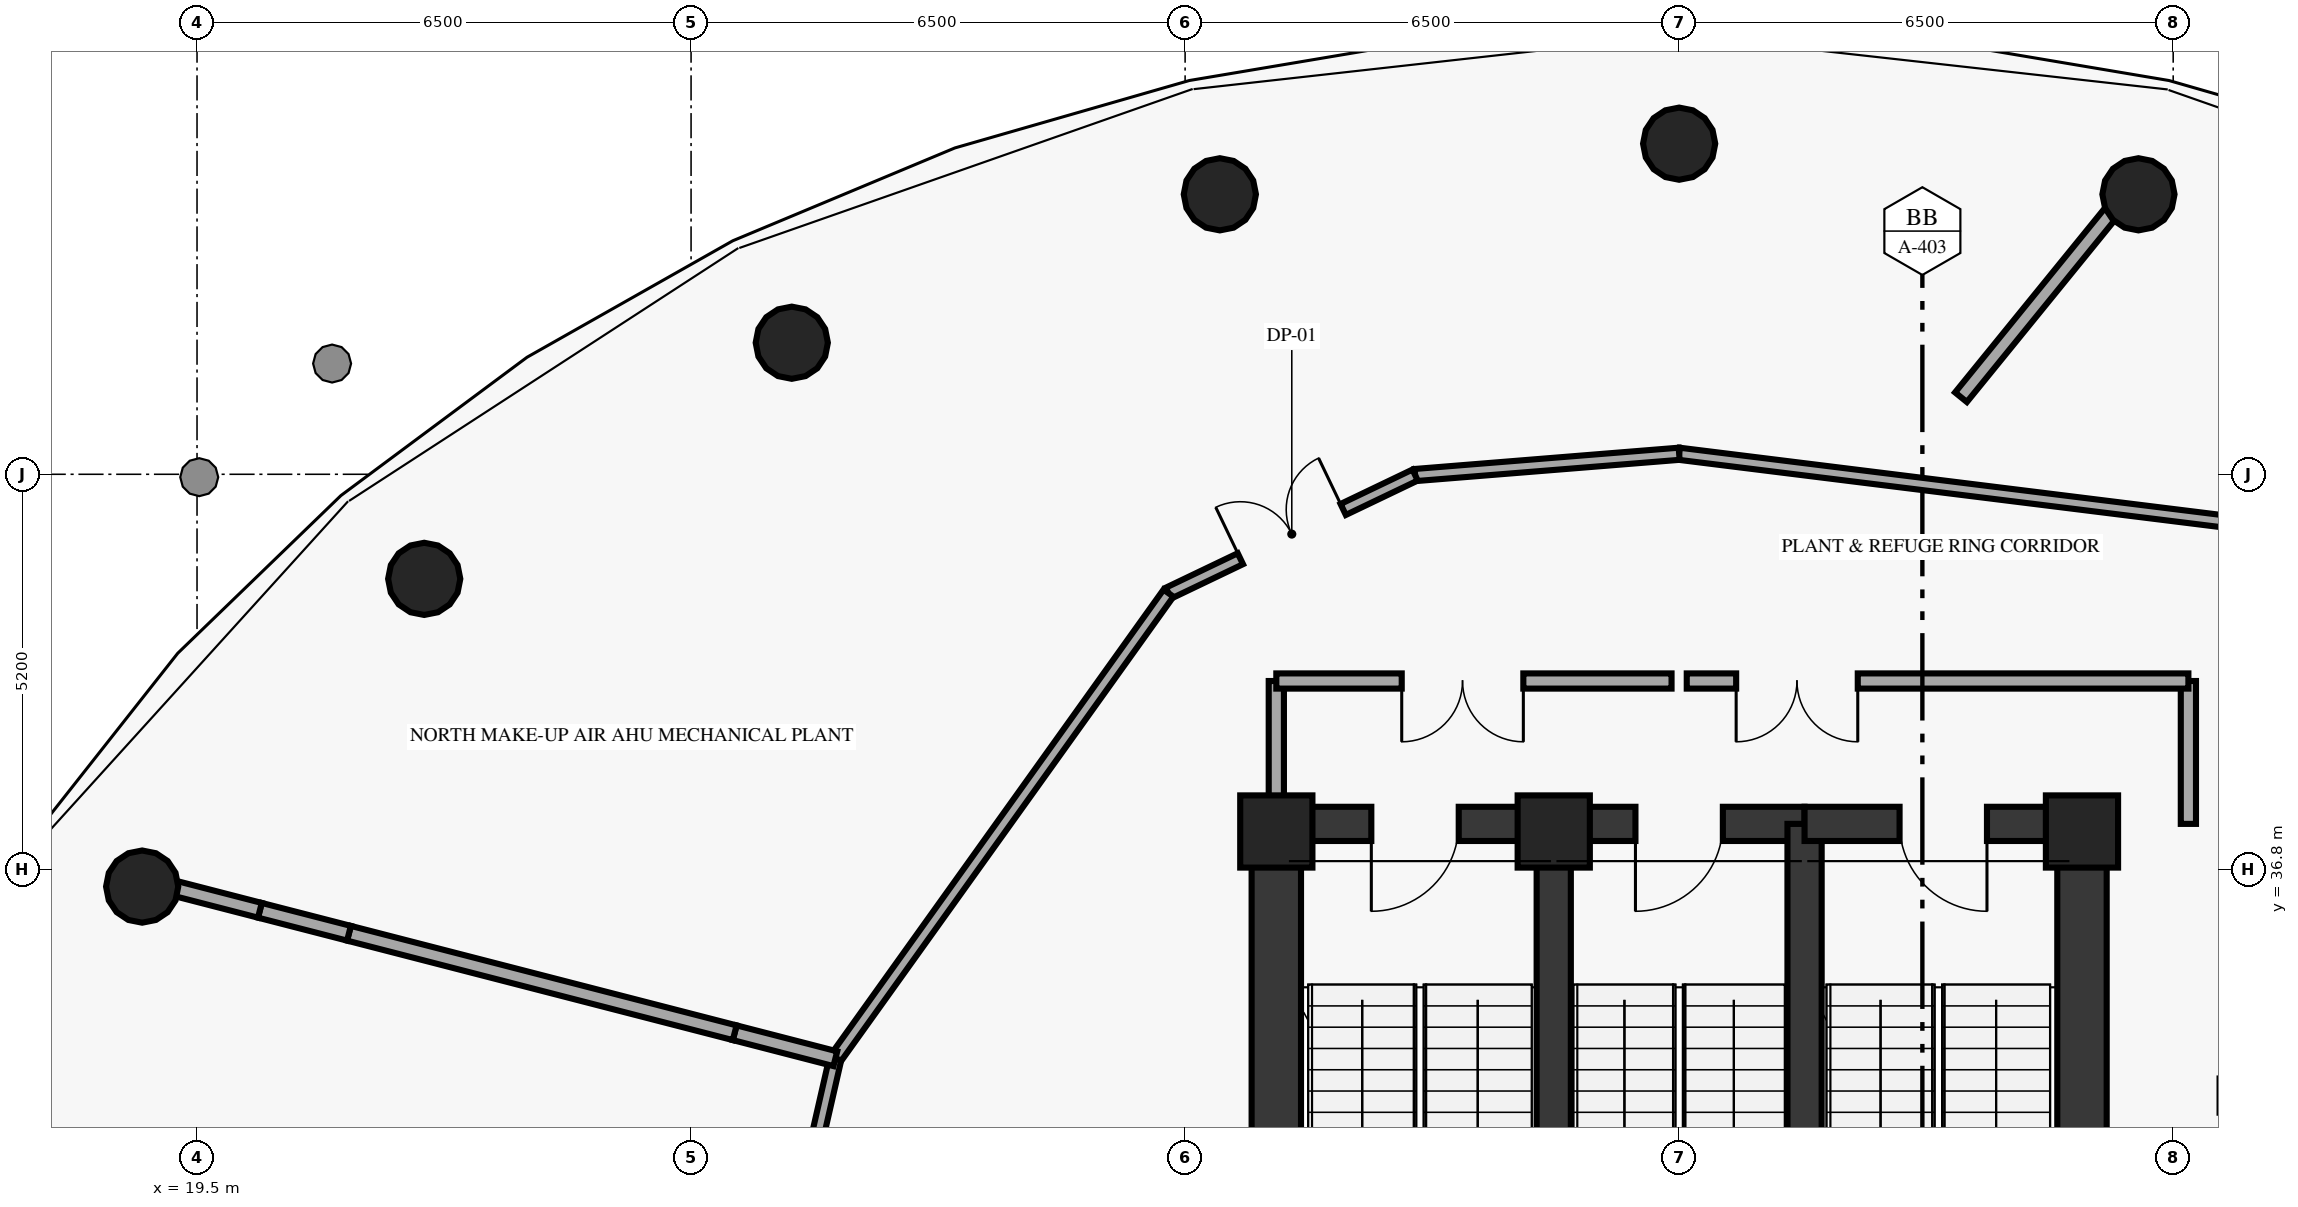
"""IFC4 building model, lengths in metres.
Left out: names, types, materials, properties, quantities, classifications, styles, units other than length and angle.
Written with IfcOpenShell. Run it as: python <this file> out.ifc"""

import sys

from ifc_helpers import new_model, si_unit, direction, frame, frame_2d, origin, origin_2d, place, context, subcontext, project, spatial, rectangle, circle, extrude, element, fill, save


model = new_model("IFC4")
c1 = context("Model", 3, precision=1e-05, world=origin(), true_north=direction((0.0, 1.0)))
c2 = subcontext(c1, "Body", "Model", "MODEL_VIEW")
j1 = project(units=[si_unit("LENGTHUNIT", "METRE"), si_unit("PLANEANGLEUNIT", "RADIAN")], contexts=[c1])
p1 = place(None, origin())
s1 = spatial("IfcSite", under=j1, at=p1, CompositionType="ELEMENT")
p2 = place(p1, origin())
s2 = spatial("IfcBuilding", under=s1, at=p2, CompositionType="ELEMENT")
p3 = place(p2, frame((0.0, 0.0, 195.95)))
s3 = spatial("IfcBuildingStorey", under=s2, at=p3, CompositionType="ELEMENT", Elevation=195.95)
for number, where, z_axis, x_axis in (
    (1, (44.3, 37.3, 0.0), (0.0, 0.0, 1.0), (1.0, 0.0, 0.0)),
    (2, (37.35, 37.3, 0.0), (0.0, 0.0, 1.0), (1.0, 0.0, 0.0)),
    (3, (33.7, 37.3, 0.0), (0.0, 0.0, 1.0), (1.0, 0.0, 0.0)),
):
    element("IfcColumn", number, at=place(p3, frame(where, z_axis=z_axis, x_axis=x_axis)), inside=s3, PredefinedType="PILASTER", context=c2, shape_type="SweptSolid", body=[
        extrude(rectangle(XDim=0.95, YDim=0.95, at=origin_2d()), origin(), (0.0, 0.0, 1.0), 6.88),
    ])
for number, where, z_axis, x_axis in (
    (4, (45.043, 45.684, 0.0), (0.0, 0.0, 1.0), (1.0, 0.0, 0.0)),
    (5, (39.0, 46.35, 0.0), (0.0, 0.0, 1.0), (1.0, 0.0, 0.0)),
    (6, (32.957, 45.684, 0.0), (0.0, 0.0, 1.0), (1.0, 0.0, 0.0)),
    (7, (27.325, 43.731, 0.0), (0.0, 0.0, 1.0), (1.0, 0.0, 0.0)),
    (8, (22.489, 40.624, 0.0), (0.0, 0.0, 1.0), (1.0, 0.0, 0.0)),
    (9, (18.778, 36.575, 0.0), (0.0, 0.0, 1.0), (1.0, 0.0, 0.0)),
):
    element("IfcColumn", number, at=place(p3, frame(where, z_axis=z_axis, x_axis=x_axis)), inside=s3, PredefinedType="COLUMN", context=c2, shape_type="SweptSolid", body=[
        extrude(circle(Radius=0.475, at=origin_2d()), origin(), (0.0, 0.0, 1.0), 6.88),
    ])
for number, where, z_axis, x_axis in (
    (10, (33.7, 29.05, 0.0), (0.0, 0.0, 1.0), (0.0, 1.0, 0.0)),
    (11, (44.3, 29.05, 0.0), (0.0, 0.0, 1.0), (0.0, 1.0, 0.0)),
):
    element("IfcWall", number, at=place(p3, frame(where, z_axis=z_axis, x_axis=x_axis)), inside=s3, PredefinedType="SHEAR", context=c2, shape_type="SweptSolid", body=[
        extrude(rectangle(XDim=8.35, YDim=0.65, at=frame_2d((4.175, 0.0))), origin(), (0.0, 0.0, 1.0), 6.88),
    ])
p4 = place(p3, frame((37.35, 37.4, 0.0), z_axis=(0.0, 0.0, 1.0), x_axis=(-1.0, 0.0, 0.0)))
e12 = element("IfcWall", 12, at=p4, inside=s3, PredefinedType="SHEAR", context=c2, shape_type="SweptSolid", body=[
    extrude(rectangle(XDim=3.65, YDim=0.45, at=frame_2d((1.825, 0.0))), origin(), (0.0, 0.0, 1.0), 6.88),
])
p5 = place(p4, frame((1.25, 0.0, 0.0)))
e13 = element("IfcOpeningElement", 13, at=p5, cuts=e12, PredefinedType="OPENING", context=c2, shape_type="SweptSolid", body=[
    extrude(rectangle(XDim=1.15, YDim=2.15, at=frame_2d((0.575, 1.075))), frame((0.0, 0.235, 0.0), z_axis=(0.0, -1.0, 0.0), x_axis=(1.0, 0.0, 0.0)), (0.0, 0.0, 1.0), 0.47),
])
p6 = place(p3, frame((37.35, 29.05, 0.0), z_axis=(0.0, 0.0, 1.0), x_axis=(0.0, 1.0, 0.0)))
e14 = element("IfcWall", 14, at=p6, inside=s3, PredefinedType="SHEAR", context=c2, shape_type="SweptSolid", body=[
    extrude(rectangle(XDim=8.35, YDim=0.45, at=frame_2d((4.175, 0.0))), origin(), (0.0, 0.0, 1.0), 6.88),
])
p7 = place(p3, frame((40.65, 37.4, 0.0), z_axis=(0.0, 0.0, 1.0), x_axis=(-1.0, 0.0, 0.0)))
e15 = element("IfcWall", 15, at=p7, inside=s3, PredefinedType="SHEAR", context=c2, shape_type="SweptSolid", body=[
    extrude(rectangle(XDim=3.3, YDim=0.45, at=frame_2d((1.65, 0.0))), origin(), (0.0, 0.0, 1.0), 6.88),
])
p8 = place(p7, frame((1.075, 0.0, 0.0)))
e16 = element("IfcOpeningElement", 16, at=p8, cuts=e15, PredefinedType="OPENING", context=c2, shape_type="SweptSolid", body=[
    extrude(rectangle(XDim=1.15, YDim=2.15, at=frame_2d((0.575, 1.075))), frame((0.0, 0.235, 0.0), z_axis=(0.0, -1.0, 0.0), x_axis=(1.0, 0.0, 0.0)), (0.0, 0.0, 1.0), 0.47),
])
p9 = place(p3, frame((40.65, 29.05, 0.0), z_axis=(0.0, 0.0, 1.0), x_axis=(0.0, 1.0, 0.0)))
e17 = element("IfcWall", 17, at=p9, inside=s3, PredefinedType="SHEAR", context=c2, shape_type="SweptSolid", body=[
    extrude(rectangle(XDim=8.35, YDim=0.45, at=frame_2d((4.175, 0.0))), origin(), (0.0, 0.0, 1.0), 6.88),
])
p10 = place(p3, frame((44.3, 37.4, 0.0), z_axis=(0.0, 0.0, 1.0), x_axis=(-1.0, 0.0, 0.0)))
e18 = element("IfcWall", 18, at=p10, inside=s3, PredefinedType="SHEAR", context=c2, shape_type="SweptSolid", body=[
    extrude(rectangle(XDim=3.65, YDim=0.45, at=frame_2d((1.825, 0.0))), origin(), (0.0, 0.0, 1.0), 6.88),
])
p11 = place(p10, frame((1.25, 0.0, 0.0)))
e19 = element("IfcOpeningElement", 19, at=p11, cuts=e18, PredefinedType="OPENING", context=c2, shape_type="SweptSolid", body=[
    extrude(rectangle(XDim=1.15, YDim=2.15, at=frame_2d((0.575, 1.075))), frame((0.0, 0.235, 0.0), z_axis=(0.0, -1.0, 0.0), x_axis=(1.0, 0.0, 0.0)), (0.0, 0.0, 1.0), 0.47),
])
for number, where, z_axis, x_axis in (
    (20, (33.7, 37.4, 0.0), (0.0, 0.0, 1.0), (0.0, 1.0, 0.0)),
    (21, (45.7, 37.4, 0.0), (0.0, 0.0, 1.0), (0.0, 1.0, 0.0)),
):
    element("IfcWall", number, at=place(p3, frame(where, z_axis=z_axis, x_axis=x_axis)), inside=s3, PredefinedType="SOLIDWALL", context=c2, shape_type="SweptSolid", body=[
        extrude(rectangle(XDim=1.88, YDim=0.2, at=frame_2d((0.94, 0.0))), origin(), (0.0, 0.0, 1.0), 6.88),
    ])
p12 = place(p3, frame((38.9, 39.28, 0.0), z_axis=(0.0, 0.0, 1.0), x_axis=(-1.0, 0.0, 0.0)))
e22 = element("IfcWall", 22, at=p12, inside=s3, PredefinedType="SOLIDWALL", context=c2, shape_type="SweptSolid", body=[
    extrude(rectangle(XDim=5.2, YDim=0.2, at=frame_2d((2.6, 0.0))), origin(), (0.0, 0.0, 1.0), 6.88),
])
p13 = place(p12, frame((1.95, 0.0, 0.0)))
e23 = element("IfcOpeningElement", 23, at=p13, cuts=e22, PredefinedType="OPENING", context=c2, shape_type="SweptSolid", body=[
    extrude(rectangle(XDim=1.6, YDim=2.2, at=frame_2d((0.8, 1.1))), frame((0.0, 0.11, 0.0), z_axis=(0.0, -1.0, 0.0), x_axis=(1.0, 0.0, 0.0)), (0.0, 0.0, 1.0), 0.22),
])
p14 = place(p3, frame((45.7, 39.28, 0.0), z_axis=(0.0, 0.0, 1.0), x_axis=(-1.0, 0.0, 0.0)))
e24 = element("IfcWall", 24, at=p14, inside=s3, PredefinedType="SOLIDWALL", context=c2, shape_type="SweptSolid", body=[
    extrude(rectangle(XDim=6.6, YDim=0.2, at=frame_2d((3.3, 0.0))), origin(), (0.0, 0.0, 1.0), 6.88),
])
p15 = place(p14, frame((4.35, 0.0, 0.0)))
e25 = element("IfcOpeningElement", 25, at=p15, cuts=e24, PredefinedType="OPENING", context=c2, shape_type="SweptSolid", body=[
    extrude(rectangle(XDim=1.6, YDim=2.2, at=frame_2d((0.8, 1.1))), frame((0.0, 0.11, 0.0), z_axis=(0.0, -1.0, 0.0), x_axis=(1.0, 0.0, 0.0)), (0.0, 0.0, 1.0), 0.22),
])
p16 = place(p3, frame((46.184, 41.378, 0.0), z_axis=(0.0, 0.0, 1.0), x_axis=(-0.992378204756, 0.12322945559, 0.0)))
e26 = element("IfcWall", 26, at=p16, inside=s3, PredefinedType="PARTITIONING", context=c2, shape_type="SweptSolid", body=[
    extrude(rectangle(XDim=7.239, YDim=0.16, at=frame_2d((3.62, 0.0))), origin(), (0.0, 0.0, 1.0), 6.88),
])
p17 = place(p3, frame((39.0, 42.27, 0.0), z_axis=(0.0, 0.0, 1.0), x_axis=(-0.99676721303, -0.080343780277, 0.0)))
e27 = element("IfcWall", 27, at=p17, inside=s3, PredefinedType="PARTITIONING", context=c2, shape_type="SweptSolid", body=[
    extrude(rectangle(XDim=3.485, YDim=0.16, at=frame_2d((1.743, 0.0))), origin(), (0.0, 0.0, 1.0), 6.88),
])
p18 = place(p3, frame((32.281, 40.436, 0.0), z_axis=(0.0, 0.0, 1.0), x_axis=(0.901911315708, 0.43192126435, 0.0)))
e28 = element("IfcWall", 28, at=p18, inside=s3, PredefinedType="PARTITIONING", context=c2, shape_type="SweptSolid", body=[
    extrude(rectangle(XDim=3.598, YDim=0.16, at=frame_2d((1.799, 0.0))), origin(), (0.0, 0.0, 1.0), 6.88),
])
p19 = place(p18, frame((1.049, 0.0, 0.0)))
e29 = element("IfcOpeningElement", 29, at=p19, cuts=e28, PredefinedType="OPENING", context=c2, shape_type="SweptSolid", body=[
    extrude(rectangle(XDim=1.5, YDim=2.2, at=frame_2d((0.75, 1.1))), frame((0.0, 0.09, 0.0), z_axis=(0.0, -1.0, 0.0), x_axis=(1.0, 0.0, 0.0)), (0.0, 0.0, 1.0), 0.18),
])
p20 = place(p3, frame((32.281, 40.436, 0.0), z_axis=(0.0, 0.0, 1.0), x_axis=(-0.581884927471, -0.813271130179, 0.0)))
e30 = element("IfcWall", 30, at=p20, inside=s3, PredefinedType="PARTITIONING", context=c2, shape_type="SweptSolid", body=[
    extrude(rectangle(XDim=7.532, YDim=0.16, at=frame_2d((3.766, 0.0))), origin(), (0.0, 0.0, 1.0), 6.88),
])
p21 = place(p3, frame((27.898, 34.31, 0.0), z_axis=(0.0, 0.0, 1.0), x_axis=(-0.223002916051, -0.974817777553, 0.0)))
e31 = element("IfcWall", 31, at=p21, inside=s3, PredefinedType="PARTITIONING", context=c2, shape_type="SweptSolid", body=[
    extrude(rectangle(XDim=7.704, YDim=0.16, at=frame_2d((3.852, 0.0))), origin(), (0.0, 0.0, 1.0), 6.88),
])
p22 = place(p3, frame((42.708, 43.014, 0.0), z_axis=(0.0, 0.0, 1.0), x_axis=(0.630674163324, 0.776047743193, 0.0)))
e32 = element("IfcWall", 32, at=p22, inside=s3, PredefinedType="SOLIDWALL", context=c2, shape_type="SweptSolid", body=[
    extrude(rectangle(XDim=3.832, YDim=0.2, at=frame_2d((1.916, 0.0))), origin(), (0.0, 0.0, 1.0), 6.88),
])
p23 = place(p3, frame((27.898, 34.31, 0.0), z_axis=(0.0, 0.0, 1.0), x_axis=(-0.968211797472, 0.250131795733, 0.0)))
e33 = element("IfcWall", 33, at=p23, inside=s3, PredefinedType="SOLIDWALL", context=c2, shape_type="SweptSolid", body=[
    extrude(rectangle(XDim=1.367, YDim=0.2, at=frame_2d((0.684, 0.0))), origin(), (0.0, 0.0, 1.0), 6.88),
])
p24 = place(p3, frame((26.574, 34.652, 0.0), z_axis=(0.0, 0.0, 1.0), x_axis=(-0.968315487536, 0.249730087491, 0.0)))
e34 = element("IfcWall", 34, at=p24, inside=s3, PredefinedType="SOLIDWALL", context=c2, shape_type="SweptSolid", body=[
    extrude(rectangle(XDim=5.241, YDim=0.2, at=frame_2d((2.621, 0.0))), origin(), (0.0, 0.0, 1.0), 5.43),
])
p25 = place(p3, frame((21.499, 35.961, 0.0), z_axis=(0.0, 0.0, 1.0), x_axis=(-0.968373282232, 0.249505884216, 0.0)))
e35 = element("IfcWall", 35, at=p25, inside=s3, PredefinedType="SOLIDWALL", context=c2, shape_type="SweptSolid", body=[
    extrude(rectangle(XDim=1.21, YDim=0.2, at=frame_2d((0.605, 0.0))), origin(), (0.0, 0.0, 1.0), 6.88),
])
p26 = place(p3, frame((20.327, 36.263, 0.0), z_axis=(0.0, 0.0, 1.0), x_axis=(-0.968266176434, 0.249921210732, 0.0)))
e36 = element("IfcWall", 36, at=p26, inside=s3, PredefinedType="SOLIDWALL", context=c2, shape_type="SweptSolid", body=[
    extrude(rectangle(XDim=1.88, YDim=0.2, at=frame_2d((0.94, 0.0))), origin(), (0.0, 0.0, 1.0), 5.53),
])
p27 = place(p5, origin())
e37 = element("IfcDoor", 37, at=p27, inside=s3, OperationType="SINGLE_SWING_RIGHT", PredefinedType="DOOR", context=c2, shape_type="SweptSolid", body=[
    extrude(rectangle(XDim=1.15, YDim=2.15, at=frame_2d((0.575, 1.075))), frame((0.0, 0.025, 0.0), z_axis=(0.0, -1.0, 0.0), x_axis=(1.0, 0.0, 0.0)), (0.0, 0.0, 1.0), 0.05),
])
fill(e13, e37)
p28 = place(p8, origin())
e38 = element("IfcDoor", 38, at=p28, inside=s3, OperationType="SINGLE_SWING_RIGHT", PredefinedType="DOOR", context=c2, shape_type="SweptSolid", body=[
    extrude(rectangle(XDim=1.15, YDim=2.15, at=frame_2d((0.575, 1.075))), frame((0.0, 0.025, 0.0), z_axis=(0.0, -1.0, 0.0), x_axis=(1.0, 0.0, 0.0)), (0.0, 0.0, 1.0), 0.05),
])
fill(e16, e38)
p29 = place(p11, origin())
e39 = element("IfcDoor", 39, at=p29, inside=s3, OperationType="SINGLE_SWING_LEFT", PredefinedType="DOOR", context=c2, shape_type="SweptSolid", body=[
    extrude(rectangle(XDim=1.15, YDim=2.15, at=frame_2d((0.575, 1.075))), frame((0.0, 0.025, 0.0), z_axis=(0.0, -1.0, 0.0), x_axis=(1.0, 0.0, 0.0)), (0.0, 0.0, 1.0), 0.05),
])
fill(e19, e39)
p30 = place(p13, origin())
e40 = element("IfcDoor", 40, at=p30, inside=s3, OperationType="DOUBLE_DOOR_SINGLE_SWING", PredefinedType="DOOR", context=c2, shape_type="SweptSolid", body=[
    extrude(rectangle(XDim=1.6, YDim=2.2, at=frame_2d((0.8, 1.1))), frame((0.0, 0.025, 0.0), z_axis=(0.0, -1.0, 0.0), x_axis=(1.0, 0.0, 0.0)), (0.0, 0.0, 1.0), 0.05),
])
fill(e23, e40)
p31 = place(p15, origin())
e41 = element("IfcDoor", 41, at=p31, inside=s3, OperationType="DOUBLE_DOOR_SINGLE_SWING", PredefinedType="DOOR", context=c2, shape_type="SweptSolid", body=[
    extrude(rectangle(XDim=1.6, YDim=2.2, at=frame_2d((0.8, 1.1))), frame((0.0, 0.025, 0.0), z_axis=(0.0, -1.0, 0.0), x_axis=(1.0, 0.0, 0.0)), (0.0, 0.0, 1.0), 0.05),
])
fill(e25, e41)
p32 = place(p19, origin())
e42 = element("IfcDoor", 42, at=p32, inside=s3, OperationType="DOUBLE_DOOR_SINGLE_SWING", PredefinedType="DOOR", context=c2, shape_type="SweptSolid", body=[
    extrude(rectangle(XDim=1.5, YDim=2.2, at=frame_2d((0.75, 1.1))), frame((0.0, 0.025, 0.0), z_axis=(0.0, -1.0, 0.0), x_axis=(1.0, 0.0, 0.0)), (0.0, 0.0, 1.0), 0.05),
])
fill(e29, e42)
save(model, sys.argv[1])
